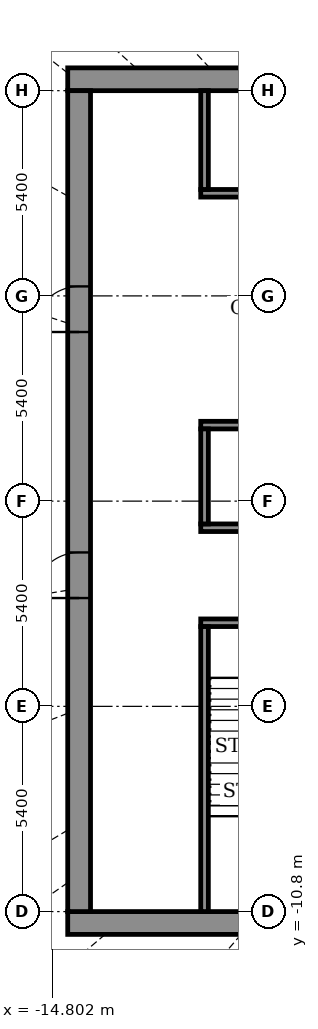
"""IFC4 building model, lengths in metres.
Left out: names, types, materials, properties, quantities, classifications, styles, units other than length and angle.
Written with IfcOpenShell. Run it as: python <this file> out.ifc"""

import sys

from ifc_helpers import new_model, si_unit, direction, frame, frame_2d, origin, place, context, subcontext, project, spatial, rectangle, extrude, element, fill, save


model = new_model("IFC4")
c1 = context("Model", 3, precision=1e-05, world=origin(), true_north=direction((0.0, 1.0)))
c2 = subcontext(c1, "Body", "Model", "MODEL_VIEW")
j1 = project(units=[si_unit("LENGTHUNIT", "METRE"), si_unit("PLANEANGLEUNIT", "RADIAN")], contexts=[c1])
p1 = place(None, origin())
s1 = spatial("IfcSite", under=j1, at=p1, CompositionType="ELEMENT")
p2 = place(p1, origin())
s2 = spatial("IfcBuilding", under=s1, at=p2, CompositionType="ELEMENT")
p3 = place(p2, frame((0.0, 0.0, 329.7)))
s3 = spatial("IfcBuildingStorey", under=s2, at=p3, CompositionType="ELEMENT", Elevation=329.7)
for number, where, z_axis, x_axis in (
    (1, (-14.4, -11.1, 0.0), (0.0, 0.0, 1.0), (1.0, 0.0, 0.0)),
    (2, (-14.4, 11.1, 0.0), (0.0, 0.0, 1.0), (1.0, 0.0, 0.0)),
):
    element("IfcWall", number, at=place(p3, frame(where, z_axis=z_axis, x_axis=x_axis)), inside=s3, PredefinedType="SHEAR", context=c2, shape_type="SweptSolid", body=[
        extrude(rectangle(XDim=28.8, YDim=0.6, at=frame_2d((14.4, 0.0))), origin(), (0.0, 0.0, 1.0), 4.6),
    ])
p4 = place(p3, frame((-14.1, -10.8, 0.0), z_axis=(0.0, 0.0, 1.0), x_axis=(0.0, 1.0, 0.0)))
e3 = element("IfcWall", 3, at=p4, inside=s3, PredefinedType="SHEAR", context=c2, shape_type="SweptSolid", body=[
    extrude(rectangle(XDim=21.6, YDim=0.6, at=frame_2d((10.8, 0.0))), origin(), (0.0, 0.0, 1.0), 4.6),
])
p5 = place(p4, frame((8.25, 0.0, 0.0)))
e4 = element("IfcOpeningElement", 4, at=p5, cuts=e3, PredefinedType="OPENING", context=c2, shape_type="SweptSolid", body=[
    extrude(rectangle(XDim=1.2, YDim=2.1, at=frame_2d((0.6, 1.05))), frame((0.0, 0.31, 0.0), z_axis=(0.0, -1.0, 0.0), x_axis=(1.0, 0.0, 0.0)), (0.0, 0.0, 1.0), 0.62),
])
p6 = place(p4, frame((15.25, 0.0, 0.0)))
e5 = element("IfcOpeningElement", 5, at=p6, cuts=e3, PredefinedType="OPENING", context=c2, shape_type="SweptSolid", body=[
    extrude(rectangle(XDim=1.2, YDim=2.1, at=frame_2d((0.6, 1.05))), frame((0.0, 0.31, 0.0), z_axis=(0.0, -1.0, 0.0), x_axis=(1.0, 0.0, 0.0)), (0.0, 0.0, 1.0), 0.62),
])
p7 = place(p3, frame((-10.9, -3.2, 0.0), z_axis=(0.0, 0.0, 1.0), x_axis=(1.0, 0.0, 0.0)))
e6 = element("IfcWall", 6, at=p7, inside=s3, PredefinedType="SHEAR", context=c2, shape_type="SweptSolid", body=[
    extrude(rectangle(XDim=21.8, YDim=0.2, at=frame_2d((10.9, 0.0))), origin(), (0.0, 0.0, 1.0), 4.05),
])
p8 = place(p7, frame((1.075, 0.0, 0.0)))
e7 = element("IfcOpeningElement", 7, at=p8, cuts=e6, PredefinedType="OPENING", context=c2, shape_type="SweptSolid", body=[
    extrude(rectangle(XDim=1.1, YDim=2.1, at=frame_2d((0.55, 1.05))), frame((0.0, 0.11, 0.0), z_axis=(0.0, -1.0, 0.0), x_axis=(1.0, 0.0, 0.0)), (0.0, 0.0, 1.0), 0.22),
])
p9 = place(p7, frame((10.325, 0.0, 0.0)))
e8 = element("IfcOpeningElement", 8, at=p9, cuts=e6, PredefinedType="OPENING", context=c2, shape_type="SweptSolid", body=[
    extrude(rectangle(XDim=1.1, YDim=2.1, at=frame_2d((0.55, 1.05))), frame((0.0, 0.11, 0.0), z_axis=(0.0, -1.0, 0.0), x_axis=(1.0, 0.0, 0.0)), (0.0, 0.0, 1.0), 0.22),
])
p10 = place(p7, frame((19.625, 0.0, 0.0)))
e9 = element("IfcOpeningElement", 9, at=p10, cuts=e6, PredefinedType="OPENING", context=c2, shape_type="SweptSolid", body=[
    extrude(rectangle(XDim=1.1, YDim=2.1, at=frame_2d((0.55, 1.05))), frame((0.0, 0.11, 0.0), z_axis=(0.0, -1.0, 0.0), x_axis=(1.0, 0.0, 0.0)), (0.0, 0.0, 1.0), 0.22),
])
p11 = place(p7, frame((5.7, 0.0, 0.0)))
e10 = element("IfcOpeningElement", 10, at=p11, cuts=e6, PredefinedType="OPENING", context=c2, shape_type="SweptSolid", body=[
    extrude(rectangle(XDim=1.1, YDim=2.1, at=frame_2d((0.55, 1.05))), frame((0.0, 0.11, 0.0), z_axis=(0.0, -1.0, 0.0), x_axis=(1.0, 0.0, 0.0)), (0.0, 0.0, 1.0), 0.22),
])
p12 = place(p7, frame((14.975, 0.0, 0.0)))
e11 = element("IfcOpeningElement", 11, at=p12, cuts=e6, PredefinedType="OPENING", context=c2, shape_type="SweptSolid", body=[
    extrude(rectangle(XDim=1.1, YDim=2.1, at=frame_2d((0.55, 1.05))), frame((0.0, 0.11, 0.0), z_axis=(0.0, -1.0, 0.0), x_axis=(1.0, 0.0, 0.0)), (0.0, 0.0, 1.0), 0.22),
])
p13 = place(p3, frame((-10.9, -0.7, 0.0), z_axis=(0.0, 0.0, 1.0), x_axis=(1.0, 0.0, 0.0)))
e12 = element("IfcWall", 12, at=p13, inside=s3, PredefinedType="SHEAR", context=c2, shape_type="SweptSolid", body=[
    extrude(rectangle(XDim=21.8, YDim=0.2, at=frame_2d((10.9, 0.0))), origin(), (0.0, 0.0, 1.0), 4.05),
])
p14 = place(p3, frame((-10.9, 2.0, 0.0), z_axis=(0.0, 0.0, 1.0), x_axis=(1.0, 0.0, 0.0)))
e13 = element("IfcWall", 13, at=p14, inside=s3, PredefinedType="SHEAR", context=c2, shape_type="SweptSolid", body=[
    extrude(rectangle(XDim=21.8, YDim=0.2, at=frame_2d((10.9, 0.0))), origin(), (0.0, 0.0, 1.0), 4.05),
])
p15 = place(p14, frame((4.95, 0.0, 0.0)))
e14 = element("IfcOpeningElement", 14, at=p15, cuts=e13, PredefinedType="OPENING", context=c2, shape_type="SweptSolid", body=[
    extrude(rectangle(XDim=1.1, YDim=2.1, at=frame_2d((0.55, 1.05))), frame((0.0, 0.11, 0.0), z_axis=(0.0, -1.0, 0.0), x_axis=(1.0, 0.0, 0.0)), (0.0, 0.0, 1.0), 0.22),
])
p16 = place(p14, frame((7.65, 0.0, 0.0)))
e15 = element("IfcOpeningElement", 15, at=p16, cuts=e13, PredefinedType="OPENING", context=c2, shape_type="SweptSolid", body=[
    extrude(rectangle(XDim=1.1, YDim=2.1, at=frame_2d((0.55, 1.05))), frame((0.0, 0.11, 0.0), z_axis=(0.0, -1.0, 0.0), x_axis=(1.0, 0.0, 0.0)), (0.0, 0.0, 1.0), 0.22),
])
p17 = place(p14, frame((10.35, 0.0, 0.0)))
e16 = element("IfcOpeningElement", 16, at=p17, cuts=e13, PredefinedType="OPENING", context=c2, shape_type="SweptSolid", body=[
    extrude(rectangle(XDim=1.1, YDim=2.1, at=frame_2d((0.55, 1.05))), frame((0.0, 0.11, 0.0), z_axis=(0.0, -1.0, 0.0), x_axis=(1.0, 0.0, 0.0)), (0.0, 0.0, 1.0), 0.22),
])
p18 = place(p14, frame((1.675, 0.0, 0.0)))
e17 = element("IfcOpeningElement", 17, at=p18, cuts=e13, PredefinedType="OPENING", context=c2, shape_type="SweptSolid", body=[
    extrude(rectangle(XDim=0.9, YDim=2.1, at=frame_2d((0.45, 1.05))), frame((0.0, 0.11, 0.0), z_axis=(0.0, -1.0, 0.0), x_axis=(1.0, 0.0, 0.0)), (0.0, 0.0, 1.0), 0.22),
])
p19 = place(p14, frame((13.825, 0.0, 0.0)))
e18 = element("IfcOpeningElement", 18, at=p19, cuts=e13, PredefinedType="OPENING", context=c2, shape_type="SweptSolid", body=[
    extrude(rectangle(XDim=0.9, YDim=2.1, at=frame_2d((0.45, 1.05))), frame((0.0, 0.11, 0.0), z_axis=(0.0, -1.0, 0.0), x_axis=(1.0, 0.0, 0.0)), (0.0, 0.0, 1.0), 0.22),
])
p20 = place(p14, frame((18.55, 0.0, 0.0)))
e19 = element("IfcOpeningElement", 19, at=p20, cuts=e13, PredefinedType="OPENING", context=c2, shape_type="SweptSolid", body=[
    extrude(rectangle(XDim=0.9, YDim=2.1, at=frame_2d((0.45, 1.05))), frame((0.0, 0.11, 0.0), z_axis=(0.0, -1.0, 0.0), x_axis=(1.0, 0.0, 0.0)), (0.0, 0.0, 1.0), 0.22),
])
p21 = place(p3, frame((-10.9, 8.1, 0.0), z_axis=(0.0, 0.0, 1.0), x_axis=(1.0, 0.0, 0.0)))
e20 = element("IfcWall", 20, at=p21, inside=s3, PredefinedType="SHEAR", context=c2, shape_type="SweptSolid", body=[
    extrude(rectangle(XDim=21.8, YDim=0.2, at=frame_2d((10.9, 0.0))), origin(), (0.0, 0.0, 1.0), 4.05),
])
p22 = place(p21, frame((4.95, 0.0, 0.0)))
e21 = element("IfcOpeningElement", 21, at=p22, cuts=e20, PredefinedType="OPENING", context=c2, shape_type="SweptSolid", body=[
    extrude(rectangle(XDim=1.1, YDim=2.1, at=frame_2d((0.55, 1.05))), frame((0.0, 0.11, 0.0), z_axis=(0.0, -1.0, 0.0), x_axis=(1.0, 0.0, 0.0)), (0.0, 0.0, 1.0), 0.22),
])
p23 = place(p21, frame((7.65, 0.0, 0.0)))
e22 = element("IfcOpeningElement", 22, at=p23, cuts=e20, PredefinedType="OPENING", context=c2, shape_type="SweptSolid", body=[
    extrude(rectangle(XDim=1.1, YDim=2.1, at=frame_2d((0.55, 1.05))), frame((0.0, 0.11, 0.0), z_axis=(0.0, -1.0, 0.0), x_axis=(1.0, 0.0, 0.0)), (0.0, 0.0, 1.0), 0.22),
])
p24 = place(p21, frame((10.35, 0.0, 0.0)))
e23 = element("IfcOpeningElement", 23, at=p24, cuts=e20, PredefinedType="OPENING", context=c2, shape_type="SweptSolid", body=[
    extrude(rectangle(XDim=1.1, YDim=2.1, at=frame_2d((0.55, 1.05))), frame((0.0, 0.11, 0.0), z_axis=(0.0, -1.0, 0.0), x_axis=(1.0, 0.0, 0.0)), (0.0, 0.0, 1.0), 0.22),
])
p25 = place(p21, frame((1.675, 0.0, 0.0)))
e24 = element("IfcOpeningElement", 24, at=p25, cuts=e20, PredefinedType="OPENING", context=c2, shape_type="SweptSolid", body=[
    extrude(rectangle(XDim=0.9, YDim=2.1, at=frame_2d((0.45, 1.05))), frame((0.0, 0.11, 0.0), z_axis=(0.0, -1.0, 0.0), x_axis=(1.0, 0.0, 0.0)), (0.0, 0.0, 1.0), 0.22),
])
p26 = place(p21, frame((13.825, 0.0, 0.0)))
e25 = element("IfcOpeningElement", 25, at=p26, cuts=e20, PredefinedType="OPENING", context=c2, shape_type="SweptSolid", body=[
    extrude(rectangle(XDim=0.9, YDim=2.1, at=frame_2d((0.45, 1.05))), frame((0.0, 0.11, 0.0), z_axis=(0.0, -1.0, 0.0), x_axis=(1.0, 0.0, 0.0)), (0.0, 0.0, 1.0), 0.22),
])
p27 = place(p21, frame((18.55, 0.0, 0.0)))
e26 = element("IfcOpeningElement", 26, at=p27, cuts=e20, PredefinedType="OPENING", context=c2, shape_type="SweptSolid", body=[
    extrude(rectangle(XDim=0.9, YDim=2.1, at=frame_2d((0.45, 1.05))), frame((0.0, 0.11, 0.0), z_axis=(0.0, -1.0, 0.0), x_axis=(1.0, 0.0, 0.0)), (0.0, 0.0, 1.0), 0.22),
])
p28 = place(p3, frame((-10.8, -10.8, 0.0), z_axis=(0.0, 0.0, 1.0), x_axis=(0.0, 1.0, 0.0)))
e27 = element("IfcWall", 27, at=p28, inside=s3, PredefinedType="SHEAR", context=c2, shape_type="SweptSolid", body=[
    extrude(rectangle(XDim=7.5, YDim=0.2, at=frame_2d((3.75, 0.0))), origin(), (0.0, 0.0, 1.0), 4.05),
])
p29 = place(p3, frame((-10.8, -0.6, 0.0), z_axis=(0.0, 0.0, 1.0), x_axis=(0.0, 1.0, 0.0)))
e28 = element("IfcWall", 28, at=p29, inside=s3, PredefinedType="STANDARD", context=c2, shape_type="SweptSolid", body=[
    extrude(rectangle(XDim=2.5, YDim=0.2, at=frame_2d((1.25, 0.0))), origin(), (0.0, 0.0, 1.0), 4.05),
])
p30 = place(p3, frame((-10.8, 8.2, 0.0), z_axis=(0.0, 0.0, 1.0), x_axis=(0.0, 1.0, 0.0)))
e29 = element("IfcWall", 29, at=p30, inside=s3, PredefinedType="STANDARD", context=c2, shape_type="SweptSolid", body=[
    extrude(rectangle(XDim=2.6, YDim=0.2, at=frame_2d((1.3, 0.0))), origin(), (0.0, 0.0, 1.0), 4.05),
])
p31 = place(p5, origin())
e30 = element("IfcDoor", 30, at=p31, inside=s3, OperationType="DOUBLE_DOOR_SINGLE_SWING", PredefinedType="DOOR", context=c2, shape_type="SweptSolid", body=[
    extrude(rectangle(XDim=1.2, YDim=2.1, at=frame_2d((0.6, 1.05))), frame((0.0, 0.025, 0.0), z_axis=(0.0, -1.0, 0.0), x_axis=(1.0, 0.0, 0.0)), (0.0, 0.0, 1.0), 0.05),
])
fill(e4, e30)
p32 = place(p6, origin())
e31 = element("IfcDoor", 31, at=p32, inside=s3, OperationType="DOUBLE_DOOR_SINGLE_SWING", PredefinedType="DOOR", context=c2, shape_type="SweptSolid", body=[
    extrude(rectangle(XDim=1.2, YDim=2.1, at=frame_2d((0.6, 1.05))), frame((0.0, 0.025, 0.0), z_axis=(0.0, -1.0, 0.0), x_axis=(1.0, 0.0, 0.0)), (0.0, 0.0, 1.0), 0.05),
])
fill(e5, e31)
save(model, sys.argv[1])
